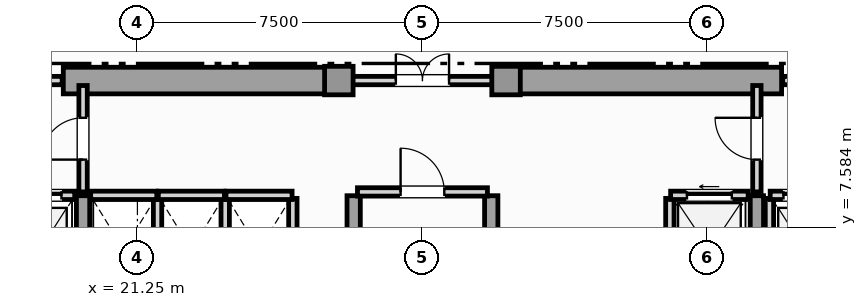
"""IFC4 building model, lengths in metres.
Left out: names, types, materials, properties, quantities, classifications, styles, units other than length and angle.
Written with IfcOpenShell. Run it as: python <this file> out.ifc"""

import sys

from ifc_helpers import new_model, si_unit, direction, frame, frame_2d, origin, origin_2d, place, context, subcontext, project, spatial, rectangle, extrude, element, fill, save


model = new_model("IFC4")
c1 = context("Model", 3, precision=1e-05, world=origin(), true_north=direction((0.0, 1.0)))
c2 = subcontext(c1, "Body", "Model", "MODEL_VIEW")
j1 = project(units=[si_unit("LENGTHUNIT", "METRE"), si_unit("PLANEANGLEUNIT", "RADIAN")], contexts=[c1])
p1 = place(None, origin())
s1 = spatial("IfcSite", under=j1, at=p1, CompositionType="ELEMENT")
p2 = place(p1, origin())
s2 = spatial("IfcBuilding", under=s1, at=p2, CompositionType="ELEMENT")
p3 = place(p2, frame((0.0, 0.0, 81.05)))
s3 = spatial("IfcBuildingStorey", under=s2, at=p3, CompositionType="ELEMENT", Elevation=81.05)
for number, where, z_axis, x_axis in (
    (1, (19.3, 11.45, 0.0), (0.0, 0.0, 1.0), (1.0, 0.0, 0.0)),
    (2, (30.9, 11.45, 0.0), (0.0, 0.0, 1.0), (1.0, 0.0, 0.0)),
):
    element("IfcWall", number, at=place(p3, frame(where, z_axis=z_axis, x_axis=x_axis)), inside=s3, PredefinedType="SHEAR", context=c2, shape_type="SweptSolid", body=[
        extrude(rectangle(XDim=7.3, YDim=0.7, at=frame_2d((3.65, 0.0))), origin(), (0.0, 0.0, 1.0), 3.6),
    ])
for number, where, z_axis, x_axis in (
    (3, (19.82, 0.92, 0.0), (0.0, 0.0, 1.0), (0.0, 1.0, 0.0)),
    (4, (26.94, 0.92, 0.0), (0.0, 0.0, 1.0), (0.0, 1.0, 0.0)),
    (5, (30.56, 0.92, 0.0), (0.0, 0.0, 1.0), (0.0, 1.0, 0.0)),
    (6, (37.55, 0.92, 0.0), (0.0, 0.0, 1.0), (0.0, 1.0, 0.0)),
):
    element("IfcWall", number, at=place(p3, frame(where, z_axis=z_axis, x_axis=x_axis)), inside=s3, PredefinedType="SHEAR", context=c2, shape_type="SweptSolid", body=[
        extrude(rectangle(XDim=7.5, YDim=0.35, at=frame_2d((3.75, 0.0))), origin(), (0.0, 0.0, 1.0), 3.6),
    ])
for number, where, z_axis, x_axis in (
    (7, (26.55, 11.45, 0.0), (0.0, 0.0, 1.0), (1.0, 0.0, 0.0)),
    (8, (30.95, 11.45, 0.0), (0.0, 0.0, 1.0), (1.0, 0.0, 0.0)),
):
    element("IfcColumn", number, at=place(p3, frame(where, z_axis=z_axis, x_axis=x_axis)), inside=s3, PredefinedType="COLUMN", context=c2, shape_type="SweptSolid", body=[
        extrude(rectangle(XDim=0.75, YDim=0.75, at=origin_2d()), origin(), (0.0, 0.0, 1.0), 3.85),
    ])
p4 = place(p3, frame((17.78, 8.43, 0.0), z_axis=(0.0, 0.0, 1.0), x_axis=(1.0, 0.0, 0.0)))
e9 = element("IfcWall", 9, at=p4, inside=s3, PredefinedType="SOLIDWALL", context=c2, shape_type="SweptSolid", body=[
    extrude(rectangle(XDim=1.82, YDim=0.22, at=frame_2d((0.91, 0.0))), origin(), (0.0, 0.0, 1.0), 3.6),
])
p5 = place(p4, frame((0.35, 0.0, 0.0)))
e10 = element("IfcOpeningElement", 10, at=p5, cuts=e9, PredefinedType="OPENING", context=c2, shape_type="SweptSolid", body=[
    extrude(rectangle(XDim=1.12, YDim=2.25, at=frame_2d((0.56, 1.125))), frame((0.0, 0.12, 0.0), z_axis=(0.0, -1.0, 0.0), x_axis=(1.0, 0.0, 0.0)), (0.0, 0.0, 1.0), 0.24),
])
p6 = place(p3, frame((37.88, 5.65, 0.0), z_axis=(0.0, 0.0, 1.0), x_axis=(0.0, 1.0, 0.0)))
e11 = element("IfcWall", 11, at=p6, inside=s3, PredefinedType="SOLIDWALL", context=c2, shape_type="SweptSolid", body=[
    extrude(rectangle(XDim=2.7, YDim=0.22, at=frame_2d((1.35, 0.0))), origin(), (0.0, 0.0, 1.0), 3.6),
])
p7 = place(p3, frame((37.9, 8.43, 0.0), z_axis=(0.0, 0.0, 1.0), x_axis=(1.0, 0.0, 0.0)))
e12 = element("IfcWall", 12, at=p7, inside=s3, PredefinedType="SOLIDWALL", context=c2, shape_type="SweptSolid", body=[
    extrude(rectangle(XDim=1.82, YDim=0.22, at=frame_2d((0.91, 0.0))), origin(), (0.0, 0.0, 1.0), 3.6),
])
p8 = place(p7, frame((0.35, 0.0, 0.0)))
e13 = element("IfcOpeningElement", 13, at=p8, cuts=e12, PredefinedType="OPENING", context=c2, shape_type="SweptSolid", body=[
    extrude(rectangle(XDim=1.12, YDim=2.25, at=frame_2d((0.56, 1.125))), frame((0.0, 0.12, 0.0), z_axis=(0.0, -1.0, 0.0), x_axis=(1.0, 0.0, 0.0)), (0.0, 0.0, 1.0), 0.24),
])
p9 = place(p3, frame((35.26, 5.65, 0.0), z_axis=(0.0, 0.0, 1.0), x_axis=(0.0, 1.0, 0.0)))
e14 = element("IfcWall", 14, at=p9, inside=s3, PredefinedType="SOLIDWALL", context=c2, shape_type="SweptSolid", body=[
    extrude(rectangle(XDim=2.7, YDim=0.22, at=frame_2d((1.35, 0.0))), origin(), (0.0, 0.0, 1.0), 3.6),
])
p10 = place(p3, frame((35.28, 8.43, 0.0), z_axis=(0.0, 0.0, 1.0), x_axis=(1.0, 0.0, 0.0)))
e15 = element("IfcWall", 15, at=p10, inside=s3, PredefinedType="SOLIDWALL", context=c2, shape_type="SweptSolid", body=[
    extrude(rectangle(XDim=2.04, YDim=0.22, at=frame_2d((1.02, 0.0))), origin(), (0.0, 0.0, 1.0), 3.6),
])
p11 = place(p10, frame((0.43, 0.0, 0.0)))
e16 = element("IfcOpeningElement", 16, at=p11, cuts=e15, PredefinedType="OPENING", context=c2, shape_type="SweptSolid", body=[
    extrude(rectangle(XDim=1.18, YDim=2.2, at=frame_2d((0.59, 1.1))), frame((0.0, 0.12, 0.0), z_axis=(0.0, -1.0, 0.0), x_axis=(1.0, 0.0, 0.0)), (0.0, 0.0, 1.0), 0.24),
])
p12 = place(p3, frame((21.78, 5.65, 0.0), z_axis=(0.0, 0.0, 1.0), x_axis=(0.0, 1.0, 0.0)))
e17 = element("IfcWall", 17, at=p12, inside=s3, PredefinedType="SOLIDWALL", context=c2, shape_type="SweptSolid", body=[
    extrude(rectangle(XDim=2.7, YDim=0.22, at=frame_2d((1.35, 0.0))), origin(), (0.0, 0.0, 1.0), 3.6),
])
p13 = place(p3, frame((20.02, 8.43, 0.0), z_axis=(0.0, 0.0, 1.0), x_axis=(1.0, 0.0, 0.0)))
e18 = element("IfcWall", 18, at=p13, inside=s3, PredefinedType="SOLIDWALL", context=c2, shape_type="SweptSolid", body=[
    extrude(rectangle(XDim=1.74, YDim=0.22, at=frame_2d((0.87, 0.0))), origin(), (0.0, 0.0, 1.0), 3.6),
])
p14 = place(p3, frame((23.56, 5.65, 0.0), z_axis=(0.0, 0.0, 1.0), x_axis=(0.0, 1.0, 0.0)))
e19 = element("IfcWall", 19, at=p14, inside=s3, PredefinedType="SOLIDWALL", context=c2, shape_type="SweptSolid", body=[
    extrude(rectangle(XDim=2.7, YDim=0.22, at=frame_2d((1.35, 0.0))), origin(), (0.0, 0.0, 1.0), 3.6),
])
p15 = place(p3, frame((21.8, 8.43, 0.0), z_axis=(0.0, 0.0, 1.0), x_axis=(1.0, 0.0, 0.0)))
e20 = element("IfcWall", 20, at=p15, inside=s3, PredefinedType="SOLIDWALL", context=c2, shape_type="SweptSolid", body=[
    extrude(rectangle(XDim=1.74, YDim=0.22, at=frame_2d((0.87, 0.0))), origin(), (0.0, 0.0, 1.0), 3.6),
])
p16 = place(p3, frame((25.34, 5.65, 0.0), z_axis=(0.0, 0.0, 1.0), x_axis=(0.0, 1.0, 0.0)))
e21 = element("IfcWall", 21, at=p16, inside=s3, PredefinedType="SOLIDWALL", context=c2, shape_type="SweptSolid", body=[
    extrude(rectangle(XDim=2.7, YDim=0.22, at=frame_2d((1.35, 0.0))), origin(), (0.0, 0.0, 1.0), 3.6),
])
p17 = place(p3, frame((23.58, 8.43, 0.0), z_axis=(0.0, 0.0, 1.0), x_axis=(1.0, 0.0, 0.0)))
e22 = element("IfcWall", 22, at=p17, inside=s3, PredefinedType="SOLIDWALL", context=c2, shape_type="SweptSolid", body=[
    extrude(rectangle(XDim=1.74, YDim=0.22, at=frame_2d((0.87, 0.0))), origin(), (0.0, 0.0, 1.0), 3.6),
])
p18 = place(p3, frame((27.04, 8.52, 0.0), z_axis=(0.0, 0.0, 1.0), x_axis=(1.0, 0.0, 0.0)))
e23 = element("IfcWall", 23, at=p18, inside=s3, PredefinedType="SOLIDWALL", context=c2, shape_type="SweptSolid", body=[
    extrude(rectangle(XDim=3.42, YDim=0.22, at=frame_2d((1.71, 0.0))), origin(), (0.0, 0.0, 1.0), 3.6),
])
p19 = place(p18, frame((1.135, 0.0, 0.0)))
e24 = element("IfcOpeningElement", 24, at=p19, cuts=e23, PredefinedType="OPENING", context=c2, shape_type="SweptSolid", body=[
    extrude(rectangle(XDim=1.15, YDim=2.2, at=frame_2d((0.575, 1.1))), frame((0.0, 0.12, 0.0), z_axis=(0.0, -1.0, 0.0), x_axis=(1.0, 0.0, 0.0)), (0.0, 0.0, 1.0), 0.24),
])
p20 = place(p3, frame((19.82, 8.52, 0.0), z_axis=(0.0, 0.0, 1.0), x_axis=(0.0, 1.0, 0.0)))
e25 = element("IfcWall", 25, at=p20, inside=s3, PredefinedType="SOLIDWALL", context=c2, shape_type="SweptSolid", body=[
    extrude(rectangle(XDim=2.8, YDim=0.22, at=frame_2d((1.4, 0.0))), origin(), (0.0, 0.0, 1.0), 3.055),
])
p21 = place(p20, frame((0.85, 0.0, 0.0)))
e26 = element("IfcOpeningElement", 26, at=p21, cuts=e25, PredefinedType="OPENING", context=c2, shape_type="SweptSolid", body=[
    extrude(rectangle(XDim=1.1, YDim=2.2, at=frame_2d((0.55, 1.1))), frame((0.0, 0.12, 0.0), z_axis=(0.0, -1.0, 0.0), x_axis=(1.0, 0.0, 0.0)), (0.0, 0.0, 1.0), 0.24),
])
p22 = place(p3, frame((37.55, 8.52, 0.0), z_axis=(0.0, 0.0, 1.0), x_axis=(0.0, 1.0, 0.0)))
e27 = element("IfcWall", 27, at=p22, inside=s3, PredefinedType="SOLIDWALL", context=c2, shape_type="SweptSolid", body=[
    extrude(rectangle(XDim=2.8, YDim=0.22, at=frame_2d((1.4, 0.0))), origin(), (0.0, 0.0, 1.0), 3.055),
])
p23 = place(p22, frame((0.85, 0.0, 0.0)))
e28 = element("IfcOpeningElement", 28, at=p23, cuts=e27, PredefinedType="OPENING", context=c2, shape_type="SweptSolid", body=[
    extrude(rectangle(XDim=1.1, YDim=2.2, at=frame_2d((0.55, 1.1))), frame((0.0, 0.12, 0.0), z_axis=(0.0, -1.0, 0.0), x_axis=(1.0, 0.0, 0.0)), (0.0, 0.0, 1.0), 0.24),
])
p24 = place(p3, frame((16.23, 11.45, 0.0), z_axis=(0.0, 0.0, 1.0), x_axis=(1.0, 0.0, 0.0)))
e29 = element("IfcWall", 29, at=p24, inside=s3, PredefinedType="SOLIDWALL", context=c2, shape_type="SweptSolid", body=[
    extrude(rectangle(XDim=3.04, YDim=0.22, at=frame_2d((1.52, 0.0))), origin(), (0.0, 0.0, 1.0), 3.6),
])
p25 = place(p24, frame((0.97, 0.0, 0.0)))
e30 = element("IfcOpeningElement", 30, at=p25, cuts=e29, PredefinedType="OPENING", context=c2, shape_type="SweptSolid", body=[
    extrude(rectangle(XDim=1.1, YDim=2.2, at=frame_2d((0.55, 1.1))), frame((0.0, 0.12, 0.0), z_axis=(0.0, -1.0, 0.0), x_axis=(1.0, 0.0, 0.0)), (0.0, 0.0, 1.0), 0.24),
])
p26 = place(p3, frame((26.63, 11.45, 0.0), z_axis=(0.0, 0.0, 1.0), x_axis=(1.0, 0.0, 0.0)))
e31 = element("IfcWall", 31, at=p26, inside=s3, PredefinedType="SOLIDWALL", context=c2, shape_type="SweptSolid", body=[
    extrude(rectangle(XDim=4.24, YDim=0.22, at=frame_2d((2.12, 0.0))), origin(), (0.0, 0.0, 1.0), 3.6),
])
p27 = place(p26, frame((1.42, 0.0, 0.0)))
e32 = element("IfcOpeningElement", 32, at=p27, cuts=e31, PredefinedType="OPENING", context=c2, shape_type="SweptSolid", body=[
    extrude(rectangle(XDim=1.4, YDim=2.2, at=frame_2d((0.7, 1.1))), frame((0.0, 0.12, 0.0), z_axis=(0.0, -1.0, 0.0), x_axis=(1.0, 0.0, 0.0)), (0.0, 0.0, 1.0), 0.24),
])
p28 = place(p3, frame((38.23, 11.45, 0.0), z_axis=(0.0, 0.0, 1.0), x_axis=(1.0, 0.0, 0.0)))
e33 = element("IfcWall", 33, at=p28, inside=s3, PredefinedType="SOLIDWALL", context=c2, shape_type="SweptSolid", body=[
    extrude(rectangle(XDim=3.04, YDim=0.22, at=frame_2d((1.52, 0.0))), origin(), (0.0, 0.0, 1.0), 3.6),
])
p29 = place(p28, frame((0.97, 0.0, 0.0)))
e34 = element("IfcOpeningElement", 34, at=p29, cuts=e33, PredefinedType="OPENING", context=c2, shape_type="SweptSolid", body=[
    extrude(rectangle(XDim=1.1, YDim=2.2, at=frame_2d((0.55, 1.1))), frame((0.0, 0.12, 0.0), z_axis=(0.0, -1.0, 0.0), x_axis=(1.0, 0.0, 0.0)), (0.0, 0.0, 1.0), 0.24),
])
p30 = place(p5, origin())
e35 = element("IfcDoor", 35, at=p30, inside=s3, OperationType="SLIDING_TO_LEFT", PredefinedType="DOOR", context=c2, shape_type="SweptSolid", body=[
    extrude(rectangle(XDim=1.12, YDim=2.25, at=frame_2d((0.56, 1.125))), frame((0.0, 0.025, 0.0), z_axis=(0.0, -1.0, 0.0), x_axis=(1.0, 0.0, 0.0)), (0.0, 0.0, 1.0), 0.05),
])
fill(e10, e35)
p31 = place(p8, origin())
e36 = element("IfcDoor", 36, at=p31, inside=s3, OperationType="SLIDING_TO_RIGHT", PredefinedType="DOOR", context=c2, shape_type="SweptSolid", body=[
    extrude(rectangle(XDim=1.12, YDim=2.25, at=frame_2d((0.56, 1.125))), frame((0.0, 0.025, 0.0), z_axis=(0.0, -1.0, 0.0), x_axis=(1.0, 0.0, 0.0)), (0.0, 0.0, 1.0), 0.05),
])
fill(e13, e36)
p32 = place(p11, origin())
e37 = element("IfcDoor", 37, at=p32, inside=s3, OperationType="SLIDING_TO_LEFT", PredefinedType="DOOR", context=c2, shape_type="SweptSolid", body=[
    extrude(rectangle(XDim=1.18, YDim=2.2, at=frame_2d((0.59, 1.1))), frame((0.0, 0.025, 0.0), z_axis=(0.0, -1.0, 0.0), x_axis=(1.0, 0.0, 0.0)), (0.0, 0.0, 1.0), 0.05),
])
fill(e16, e37)
p33 = place(p19, origin())
e38 = element("IfcDoor", 38, at=p33, inside=s3, OperationType="SINGLE_SWING_LEFT", PredefinedType="DOOR", context=c2, shape_type="SweptSolid", body=[
    extrude(rectangle(XDim=1.15, YDim=2.2, at=frame_2d((0.575, 1.1))), frame((0.0, 0.025, 0.0), z_axis=(0.0, -1.0, 0.0), x_axis=(1.0, 0.0, 0.0)), (0.0, 0.0, 1.0), 0.05),
])
fill(e24, e38)
p34 = place(p21, origin())
e39 = element("IfcDoor", 39, at=p34, inside=s3, OperationType="SINGLE_SWING_LEFT", PredefinedType="DOOR", context=c2, shape_type="SweptSolid", body=[
    extrude(rectangle(XDim=1.1, YDim=2.2, at=frame_2d((0.55, 1.1))), frame((0.0, 0.025, 0.0), z_axis=(0.0, -1.0, 0.0), x_axis=(1.0, 0.0, 0.0)), (0.0, 0.0, 1.0), 0.05),
])
fill(e26, e39)
p35 = place(p23, origin())
e40 = element("IfcDoor", 40, at=p35, inside=s3, OperationType="SINGLE_SWING_RIGHT", PredefinedType="DOOR", context=c2, shape_type="SweptSolid", body=[
    extrude(rectangle(XDim=1.1, YDim=2.2, at=frame_2d((0.55, 1.1))), frame((0.0, 0.025, 0.0), z_axis=(0.0, -1.0, 0.0), x_axis=(1.0, 0.0, 0.0)), (0.0, 0.0, 1.0), 0.05),
])
fill(e28, e40)
p36 = place(p27, origin())
e41 = element("IfcDoor", 41, at=p36, inside=s3, OperationType="DOUBLE_DOOR_SINGLE_SWING", PredefinedType="DOOR", context=c2, shape_type="SweptSolid", body=[
    extrude(rectangle(XDim=1.4, YDim=2.2, at=frame_2d((0.7, 1.1))), frame((0.0, 0.025, 0.0), z_axis=(0.0, -1.0, 0.0), x_axis=(1.0, 0.0, 0.0)), (0.0, 0.0, 1.0), 0.05),
])
fill(e32, e41)
save(model, sys.argv[1])
